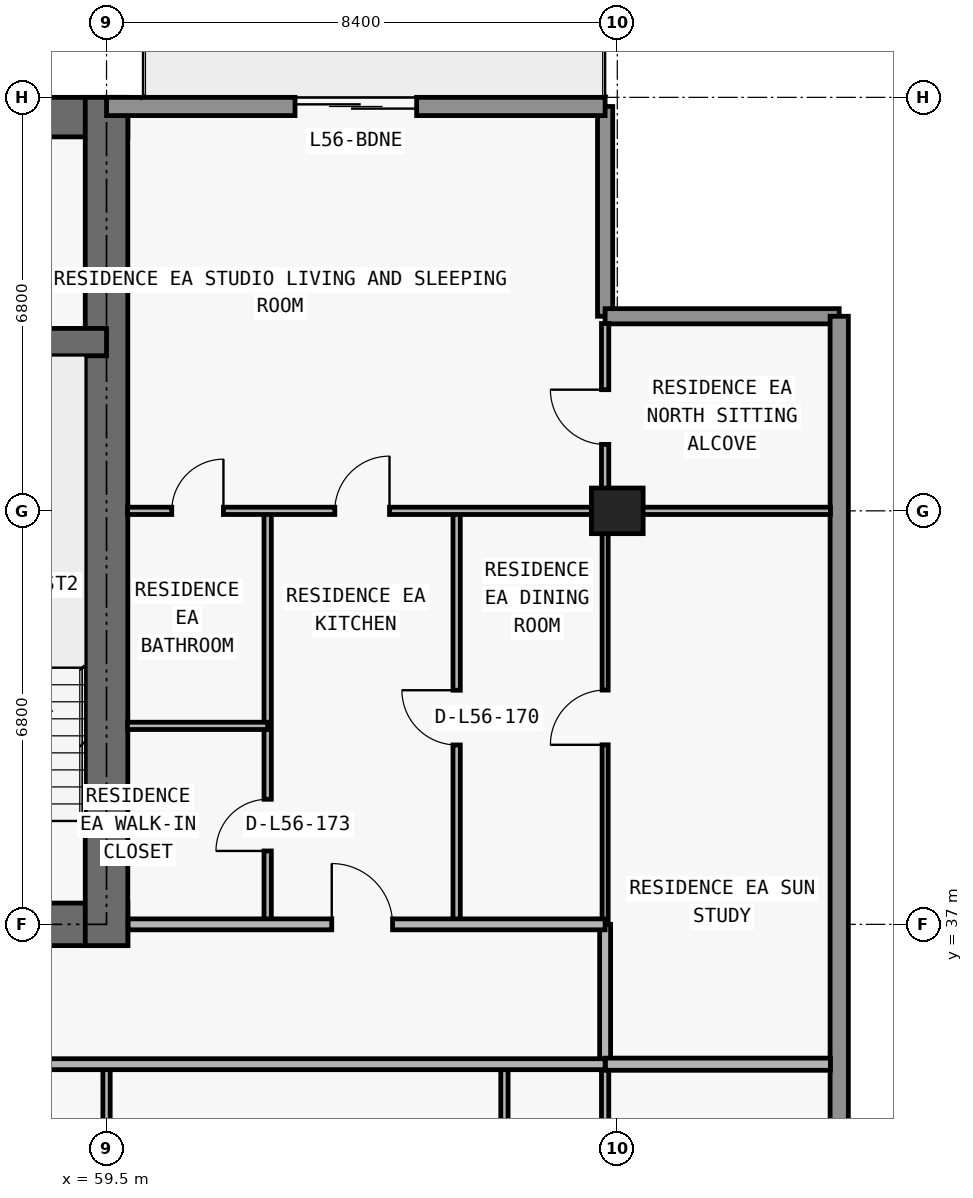
"""IFC4 building model, lengths in metres.
Left out: names, types, materials, properties, quantities, classifications, styles, units other than length and angle.
Written with IfcOpenShell. Run it as: python <this file> out.ifc"""

import sys

from ifc_helpers import new_model, si_unit, direction, frame, frame_2d, origin, origin_2d, place, context, subcontext, project, spatial, rectangle, extrude, element, fill, save


model = new_model("IFC4")
c1 = context("Model", 3, precision=1e-05, world=origin(), true_north=direction((0.0, 1.0)))
c2 = subcontext(c1, "Body", "Model", "MODEL_VIEW")
j1 = project(units=[si_unit("LENGTHUNIT", "METRE"), si_unit("PLANEANGLEUNIT", "RADIAN")], contexts=[c1])
p1 = place(None, origin())
s1 = spatial("IfcSite", under=j1, at=p1, CompositionType="ELEMENT")
p2 = place(p1, origin())
s2 = spatial("IfcBuilding", under=s1, at=p2, CompositionType="ELEMENT")
p3 = place(p2, frame((0.0, 0.0, 201.6)))
s3 = spatial("IfcBuildingStorey", under=s2, at=p3, CompositionType="ELEMENT", Elevation=201.6)
p4 = place(p3, frame((67.9, 43.8, 0.0), z_axis=(0.0, 0.0, 1.0), x_axis=(1.0, 0.0, 0.0)))
e1 = element("IfcColumn", 1, at=p4, inside=s3, PredefinedType="COLUMN", context=c2, shape_type="SweptSolid", body=[
    extrude(rectangle(XDim=0.85, YDim=0.75, at=origin_2d()), origin(), (0.0, 0.0, 1.0), 3.05),
])
p5 = place(p3, frame((17.95, 37.0, 0.0), z_axis=(0.0, 0.0, 1.0), x_axis=(1.0, 0.0, 0.0)))
e2 = element("IfcWall", 2, at=p5, inside=s3, PredefinedType="SHEAR", context=c2, shape_type="SweptSolid", body=[
    extrude(rectangle(XDim=41.9, YDim=0.7, at=frame_2d((20.95, 0.0))), origin(), (0.0, 0.0, 1.0), 3.05),
])
p6 = place(p5, frame((14.35, 0.0, 0.0)))
e3 = element("IfcOpeningElement", 3, at=p6, cuts=e2, PredefinedType="OPENING", context=c2, shape_type="SweptSolid", body=[
    extrude(rectangle(XDim=1.1, YDim=2.15, at=frame_2d((0.55, 1.075))), frame((0.0, 0.36, 0.0), z_axis=(0.0, -1.0, 0.0), x_axis=(1.0, 0.0, 0.0)), (0.0, 0.0, 1.0), 0.72),
])
p7 = place(p5, frame((6.2, 0.0, 0.0)))
e4 = element("IfcOpeningElement", 4, at=p7, cuts=e2, PredefinedType="OPENING", context=c2, shape_type="SweptSolid", body=[
    extrude(rectangle(XDim=1.05, YDim=2.15, at=frame_2d((0.525, 1.075))), frame((0.0, 0.36, 0.0), z_axis=(0.0, -1.0, 0.0), x_axis=(1.0, 0.0, 0.0)), (0.0, 0.0, 1.0), 0.72),
])
p8 = place(p5, frame((34.7, 0.0, 0.0)))
e5 = element("IfcOpeningElement", 5, at=p8, cuts=e2, PredefinedType="OPENING", context=c2, shape_type="SweptSolid", body=[
    extrude(rectangle(XDim=1.05, YDim=2.15, at=frame_2d((0.525, 1.075))), frame((0.0, 0.36, 0.0), z_axis=(0.0, -1.0, 0.0), x_axis=(1.0, 0.0, 0.0)), (0.0, 0.0, 1.0), 0.72),
])
p9 = place(p5, frame((10.812, 0.0, 0.0)))
e6 = element("IfcOpeningElement", 6, at=p9, cuts=e2, PredefinedType="OPENING", context=c2, shape_type="SweptSolid", body=[
    extrude(rectangle(XDim=1.05, YDim=2.15, at=frame_2d((0.525, 1.075))), frame((0.0, 0.36, 0.0), z_axis=(0.0, -1.0, 0.0), x_axis=(1.0, 0.0, 0.0)), (0.0, 0.0, 1.0), 0.72),
])
p10 = place(p5, frame((24.05, 0.0, 0.0)))
e7 = element("IfcOpeningElement", 7, at=p10, cuts=e2, PredefinedType="OPENING", context=c2, shape_type="SweptSolid", body=[
    extrude(rectangle(XDim=1.05, YDim=2.15, at=frame_2d((0.525, 1.075))), frame((0.0, 0.36, 0.0), z_axis=(0.0, -1.0, 0.0), x_axis=(1.0, 0.0, 0.0)), (0.0, 0.0, 1.0), 0.72),
])
p11 = place(p3, frame((17.95, 50.275, 0.0), z_axis=(0.0, 0.0, 1.0), x_axis=(1.0, 0.0, 0.0)))
e8 = element("IfcWall", 8, at=p11, inside=s3, PredefinedType="SHEAR", context=c2, shape_type="SweptSolid", body=[
    extrude(rectangle(XDim=41.9, YDim=0.65, at=frame_2d((20.95, 0.0))), origin(), (0.0, 0.0, 1.0), 3.05),
])
p12 = place(p3, frame((59.5, 36.65, 0.0), z_axis=(0.0, 0.0, 1.0), x_axis=(0.0, 1.0, 0.0)))
e9 = element("IfcWall", 9, at=p12, inside=s3, PredefinedType="SHEAR", context=c2, shape_type="SweptSolid", body=[
    extrude(rectangle(XDim=13.95, YDim=0.7, at=frame_2d((6.975, 0.0))), origin(), (0.0, 0.0, 1.0), 3.05),
])
p13 = place(p3, frame((18.3, 46.575, 0.0), z_axis=(0.0, 0.0, 1.0), x_axis=(1.0, 0.0, 0.0)))
e10 = element("IfcWall", 10, at=p13, inside=s3, PredefinedType="SHEAR", context=c2, shape_type="SweptSolid", body=[
    extrude(rectangle(XDim=41.2, YDim=0.45, at=frame_2d((20.6, 0.0))), origin(), (0.0, 0.0, 1.0), 3.05),
])
p14 = place(p13, frame((7.6, 0.0, 0.0)))
e11 = element("IfcOpeningElement", 11, at=p14, cuts=e10, PredefinedType="OPENING", context=c2, shape_type="SweptSolid", body=[
    extrude(rectangle(XDim=1.0, YDim=2.2, at=frame_2d((0.5, 1.1))), frame((0.0, 0.235, 0.0), z_axis=(0.0, -1.0, 0.0), x_axis=(1.0, 0.0, 0.0)), (0.0, 0.0, 1.0), 0.47),
])
p15 = place(p13, frame((32.625, 0.0, 0.0)))
e12 = element("IfcOpeningElement", 12, at=p15, cuts=e10, PredefinedType="OPENING", context=c2, shape_type="SweptSolid", body=[
    extrude(rectangle(XDim=1.05, YDim=2.15, at=frame_2d((0.525, 1.075))), frame((0.0, 0.235, 0.0), z_axis=(0.0, -1.0, 0.0), x_axis=(1.0, 0.0, 0.0)), (0.0, 0.0, 1.0), 0.47),
])
p16 = place(p3, frame((67.7, 50.45, 0.0), z_axis=(0.0, 0.0, 1.0), x_axis=(0.0, -1.0, 0.0)))
e13 = element("IfcWall", 13, at=p16, inside=s3, PredefinedType="ELEMENTEDWALL", context=c2, shape_type="SweptSolid", body=[
    extrude(rectangle(XDim=3.45, YDim=0.25, at=frame_2d((1.725, 0.0))), origin(), (0.0, 0.0, 1.0), 3.05),
])
p17 = place(p3, frame((67.7, 47.0, 0.0), z_axis=(0.0, 0.0, 1.0), x_axis=(1.0, 0.0, 0.0)))
e14 = element("IfcWall", 14, at=p17, inside=s3, PredefinedType="ELEMENTEDWALL", context=c2, shape_type="SweptSolid", body=[
    extrude(rectangle(XDim=3.85, YDim=0.25, at=frame_2d((1.925, 0.0))), origin(), (0.0, 0.0, 1.0), 3.05),
])
p18 = place(p3, frame((71.55, 47.0, 0.0), z_axis=(0.0, 0.0, 1.0), x_axis=(0.0, -1.0, 0.0)))
e15 = element("IfcWall", 15, at=p18, inside=s3, PredefinedType="STANDARD", context=c2, shape_type="SweptSolid", body=[
    extrude(rectangle(XDim=17.9, YDim=0.3, at=frame_2d((8.95, 0.0))), origin(), (0.0, 0.0, 1.0), 3.05),
])
p19 = place(p3, frame((59.5, 50.45, 0.0), z_axis=(0.0, 0.0, 1.0), x_axis=(1.0, 0.0, 0.0)))
e16 = element("IfcWall", 16, at=p19, inside=s3, PredefinedType="STANDARD", context=c2, shape_type="SweptSolid", body=[
    extrude(rectangle(XDim=8.2, YDim=0.3, at=frame_2d((4.1, 0.0))), origin(), (0.0, 0.0, 1.0), 3.05),
])
p20 = place(p19, frame((3.1, 0.0, 0.0)))
e17 = element("IfcOpeningElement", 17, at=p20, cuts=e16, PredefinedType="OPENING", context=c2, shape_type="SweptSolid", body=[
    extrude(rectangle(XDim=2.0, YDim=2.3, at=frame_2d((1.0, 1.15))), frame((0.0, 0.16, 0.0), z_axis=(0.0, -1.0, 0.0), x_axis=(1.0, 0.0, 0.0)), (0.0, 0.0, 1.0), 0.32),
])
p21 = place(p3, frame((59.5, 11.24, 0.0), z_axis=(0.0, 0.0, 1.0), x_axis=(0.0, 1.0, 0.0)))
e18 = element("IfcWall", 18, at=p21, inside=s3, PredefinedType="PARTITIONING", context=c2, shape_type="SweptSolid", body=[
    extrude(rectangle(XDim=23.46, YDim=0.12, at=frame_2d((11.73, 0.0))), origin(), (0.0, 0.0, 1.0), 2.263),
])
p22 = place(p21, frame((14.71, 0.0, 0.0)))
e19 = element("IfcOpeningElement", 19, at=p22, cuts=e18, PredefinedType="OPENING", context=c2, shape_type="SweptSolid", body=[
    extrude(rectangle(XDim=0.9, YDim=2.15, at=frame_2d((0.45, 1.075))), frame((0.0, 0.07, 0.0), z_axis=(0.0, -1.0, 0.0), x_axis=(1.0, 0.0, 0.0)), (0.0, 0.0, 1.0), 0.14),
])
p23 = place(p3, frame((62.15, 37.0, 0.0), z_axis=(0.0, 0.0, 1.0), x_axis=(0.0, 1.0, 0.0)))
e20 = element("IfcWall", 20, at=p23, inside=s3, PredefinedType="PARTITIONING", context=c2, shape_type="SweptSolid", body=[
    extrude(rectangle(XDim=6.8, YDim=0.12, at=frame_2d((3.4, 0.0))), origin(), (0.0, 0.0, 1.0), 2.578),
])
p24 = place(p23, frame((1.207, 0.0, 0.0)))
e21 = element("IfcOpeningElement", 21, at=p24, cuts=e20, PredefinedType="OPENING", context=c2, shape_type="SweptSolid", body=[
    extrude(rectangle(XDim=0.85, YDim=2.1, at=frame_2d((0.425, 1.05))), frame((0.0, 0.07, 0.0), z_axis=(0.0, -1.0, 0.0), x_axis=(1.0, 0.0, 0.0)), (0.0, 0.0, 1.0), 0.14),
])
p25 = place(p3, frame((65.258, 37.0, 0.0), z_axis=(0.0, 0.0, 1.0), x_axis=(0.0, 1.0, 0.0)))
e22 = element("IfcWall", 22, at=p25, inside=s3, PredefinedType="PARTITIONING", context=c2, shape_type="SweptSolid", body=[
    extrude(rectangle(XDim=6.8, YDim=0.12, at=frame_2d((3.4, 0.0))), origin(), (0.0, 0.0, 1.0), 2.679),
])
p26 = place(p25, frame((2.95, 0.0, 0.0)))
e23 = element("IfcOpeningElement", 23, at=p26, cuts=e22, PredefinedType="OPENING", context=c2, shape_type="SweptSolid", body=[
    extrude(rectangle(XDim=0.9, YDim=2.15, at=frame_2d((0.45, 1.075))), frame((0.0, 0.07, 0.0), z_axis=(0.0, -1.0, 0.0), x_axis=(1.0, 0.0, 0.0)), (0.0, 0.0, 1.0), 0.14),
])
p27 = place(p3, frame((66.044, 28.6, 0.0), z_axis=(0.0, 0.0, 1.0), x_axis=(0.0, 1.0, 0.0)))
e24 = element("IfcWall", 24, at=p27, inside=s3, PredefinedType="PARTITIONING", context=c2, shape_type="SweptSolid", body=[
    extrude(rectangle(XDim=6.1, YDim=0.12, at=frame_2d((3.05, 0.0))), origin(), (0.0, 0.0, 1.0), 3.05),
])
p28 = place(p27, frame((2.625, 0.0, 0.0)))
e25 = element("IfcOpeningElement", 25, at=p28, cuts=e24, PredefinedType="OPENING", context=c2, shape_type="SweptSolid", body=[
    extrude(rectangle(XDim=0.85, YDim=2.1, at=frame_2d((0.425, 1.05))), frame((0.0, 0.07, 0.0), z_axis=(0.0, -1.0, 0.0), x_axis=(1.0, 0.0, 0.0)), (0.0, 0.0, 1.0), 0.14),
])
p29 = place(p3, frame((67.7, 11.32, 0.0), z_axis=(0.0, 0.0, 1.0), x_axis=(0.0, 1.0, 0.0)))
e26 = element("IfcWall", 26, at=p29, inside=s3, PredefinedType="PARTITIONING", context=c2, shape_type="SweptSolid", body=[
    extrude(rectangle(XDim=23.38, YDim=0.12, at=frame_2d((11.69, 0.0))), origin(), (0.0, 0.0, 1.0), 2.263),
])
p30 = place(p29, frame((14.63, 0.0, 0.0)))
e27 = element("IfcOpeningElement", 27, at=p30, cuts=e26, PredefinedType="OPENING", context=c2, shape_type="SweptSolid", body=[
    extrude(rectangle(XDim=0.9, YDim=2.15, at=frame_2d((0.45, 1.075))), frame((0.0, 0.07, 0.0), z_axis=(0.0, -1.0, 0.0), x_axis=(1.0, 0.0, 0.0)), (0.0, 0.0, 1.0), 0.14),
])
p31 = place(p3, frame((67.7, 34.705, 0.0), z_axis=(0.0, 0.0, 1.0), x_axis=(0.0, 1.0, 0.0)))
e28 = element("IfcWall", 28, at=p31, inside=s3, PredefinedType="PARTITIONING", context=c2, shape_type="SweptSolid", body=[
    extrude(rectangle(XDim=2.295, YDim=0.18, at=frame_2d((1.147, 0.0))), origin(), (0.0, 0.0, 1.0), 2.263),
])
p32 = place(p3, frame((67.7, 37.005, 0.0), z_axis=(0.0, 0.0, 1.0), x_axis=(0.0, 1.0, 0.0)))
e29 = element("IfcWall", 29, at=p32, inside=s3, PredefinedType="MOVABLE", context=c2, shape_type="SweptSolid", body=[
    extrude(rectangle(XDim=6.795, YDim=0.1, at=frame_2d((3.397, 0.0))), origin(), (0.0, 0.0, 1.0), 2.263),
])
p33 = place(p32, frame((2.948, 0.0, 0.0)))
e30 = element("IfcOpeningElement", 30, at=p33, cuts=e29, PredefinedType="OPENING", context=c2, shape_type="SweptSolid", body=[
    extrude(rectangle(XDim=0.9, YDim=2.15, at=frame_2d((0.45, 1.075))), frame((0.0, 0.06, 0.0), z_axis=(0.0, -1.0, 0.0), x_axis=(1.0, 0.0, 0.0)), (0.0, 0.0, 1.0), 0.12),
])
p34 = place(p3, frame((67.7, 43.805, 0.0), z_axis=(0.0, 0.0, 1.0), x_axis=(0.0, 1.0, 0.0)))
e31 = element("IfcWall", 31, at=p34, inside=s3, PredefinedType="PARTITIONING", context=c2, shape_type="SweptSolid", body=[
    extrude(rectangle(XDim=3.075, YDim=0.12, at=frame_2d((1.538, 0.0))), origin(), (0.0, 0.0, 1.0), 3.05),
])
p35 = place(p34, frame((1.087, 0.0, 0.0)))
e32 = element("IfcOpeningElement", 32, at=p35, cuts=e31, PredefinedType="OPENING", context=c2, shape_type="SweptSolid", body=[
    extrude(rectangle(XDim=0.9, YDim=2.15, at=frame_2d((0.45, 1.075))), frame((0.0, 0.07, 0.0), z_axis=(0.0, -1.0, 0.0), x_axis=(1.0, 0.0, 0.0)), (0.0, 0.0, 1.0), 0.14),
])
p36 = place(p3, frame((41.2, 34.7, 0.0), z_axis=(0.0, 0.0, 1.0), x_axis=(1.0, 0.0, 0.0)))
e33 = element("IfcWall", 33, at=p36, inside=s3, PredefinedType="PARTITIONING", context=c2, shape_type="SweptSolid", body=[
    extrude(rectangle(XDim=26.5, YDim=0.18, at=frame_2d((13.25, 0.0))), origin(), (0.0, 0.0, 1.0), 3.05),
])
p37 = place(p36, frame((12.77, 0.0, 0.0)))
e34 = element("IfcOpeningElement", 34, at=p37, cuts=e33, PredefinedType="OPENING", context=c2, shape_type="SweptSolid", body=[
    extrude(rectangle(XDim=1.0, YDim=2.2, at=frame_2d((0.5, 1.1))), frame((0.0, 0.1, 0.0), z_axis=(0.0, -1.0, 0.0), x_axis=(1.0, 0.0, 0.0)), (0.0, 0.0, 1.0), 0.2),
])
p38 = place(p3, frame((67.705, 34.7, 0.0), z_axis=(0.0, 0.0, 1.0), x_axis=(1.0, 0.0, 0.0)))
e35 = element("IfcWall", 35, at=p38, inside=s3, PredefinedType="PARTITIONING", context=c2, shape_type="SweptSolid", body=[
    extrude(rectangle(XDim=3.7, YDim=0.2, at=frame_2d((1.85, 0.0))), origin(), (0.0, 0.0, 1.0), 3.05),
])
p39 = place(p3, frame((59.855, 37.0, 0.0), z_axis=(0.0, 0.0, 1.0), x_axis=(1.0, 0.0, 0.0)))
e36 = element("IfcWall", 36, at=p39, inside=s3, PredefinedType="PARTITIONING", context=c2, shape_type="SweptSolid", body=[
    extrude(rectangle(XDim=7.845, YDim=0.18, at=frame_2d((3.922, 0.0))), origin(), (0.0, 0.0, 1.0), 3.05),
])
p40 = place(p39, frame((3.349, 0.0, 0.0)))
e37 = element("IfcOpeningElement", 37, at=p40, cuts=e36, PredefinedType="OPENING", context=c2, shape_type="SweptSolid", body=[
    extrude(rectangle(XDim=1.0, YDim=2.2, at=frame_2d((0.5, 1.1))), frame((0.0, 0.1, 0.0), z_axis=(0.0, -1.0, 0.0), x_axis=(1.0, 0.0, 0.0)), (0.0, 0.0, 1.0), 0.2),
])
p41 = place(p3, frame((59.845, 40.264, 0.0), z_axis=(0.0, 0.0, 1.0), x_axis=(1.0, 0.0, 0.0)))
e38 = element("IfcWall", 38, at=p41, inside=s3, PredefinedType="PARTITIONING", context=c2, shape_type="SweptSolid", body=[
    extrude(rectangle(XDim=2.305, YDim=0.12, at=frame_2d((1.152, 0.0))), origin(), (0.0, 0.0, 1.0), 3.05),
])
p42 = place(p3, frame((59.845, 43.8, 0.0), z_axis=(0.0, 0.0, 1.0), x_axis=(1.0, 0.0, 0.0)))
e39 = element("IfcWall", 39, at=p42, inside=s3, PredefinedType="PARTITIONING", context=c2, shape_type="SweptSolid", body=[
    extrude(rectangle(XDim=11.56, YDim=0.12, at=frame_2d((5.78, 0.0))), origin(), (0.0, 0.0, 1.0), 2.418),
])
p43 = place(p42, frame((3.409, 0.0, 0.0)))
e40 = element("IfcOpeningElement", 40, at=p43, cuts=e39, PredefinedType="OPENING", context=c2, shape_type="SweptSolid", body=[
    extrude(rectangle(XDim=0.9, YDim=2.15, at=frame_2d((0.45, 1.075))), frame((0.0, 0.07, 0.0), z_axis=(0.0, -1.0, 0.0), x_axis=(1.0, 0.0, 0.0)), (0.0, 0.0, 1.0), 0.14),
])
p44 = place(p42, frame((0.728, 0.0, 0.0)))
e41 = element("IfcOpeningElement", 41, at=p44, cuts=e39, PredefinedType="OPENING", context=c2, shape_type="SweptSolid", body=[
    extrude(rectangle(XDim=0.85, YDim=2.1, at=frame_2d((0.425, 1.05))), frame((0.0, 0.07, 0.0), z_axis=(0.0, -1.0, 0.0), x_axis=(1.0, 0.0, 0.0)), (0.0, 0.0, 1.0), 0.14),
])
p45 = place(p20, origin())
e42 = element("IfcDoor", 42, at=p45, inside=s3, OperationType="DOUBLE_DOOR_SLIDING", PredefinedType="DOOR", context=c2, shape_type="SweptSolid", body=[
    extrude(rectangle(XDim=2.0, YDim=2.3, at=frame_2d((1.0, 1.15))), frame((0.0, 0.025, 0.0), z_axis=(0.0, -1.0, 0.0), x_axis=(1.0, 0.0, 0.0)), (0.0, 0.0, 1.0), 0.05),
])
fill(e17, e42)
p46 = place(p26, origin())
e43 = element("IfcDoor", 43, at=p46, inside=s3, OperationType="SINGLE_SWING_RIGHT", PredefinedType="DOOR", context=c2, shape_type="SweptSolid", body=[
    extrude(rectangle(XDim=0.9, YDim=2.15, at=frame_2d((0.45, 1.075))), frame((0.0, 0.025, 0.0), z_axis=(0.0, -1.0, 0.0), x_axis=(1.0, 0.0, 0.0)), (0.0, 0.0, 1.0), 0.05),
])
fill(e23, e43)
p47 = place(p40, origin())
e44 = element("IfcDoor", 44, at=p47, inside=s3, OperationType="SINGLE_SWING_LEFT", PredefinedType="DOOR", context=c2, shape_type="SweptSolid", body=[
    extrude(rectangle(XDim=1.0, YDim=2.2, at=frame_2d((0.5, 1.1))), frame((0.0, 0.025, 0.0), z_axis=(0.0, -1.0, 0.0), x_axis=(1.0, 0.0, 0.0)), (0.0, 0.0, 1.0), 0.05),
])
fill(e37, e44)
p48 = place(p43, origin())
e45 = element("IfcDoor", 45, at=p48, inside=s3, OperationType="SINGLE_SWING_RIGHT", PredefinedType="DOOR", context=c2, shape_type="SweptSolid", body=[
    extrude(rectangle(XDim=0.9, YDim=2.15, at=frame_2d((0.45, 1.075))), frame((0.0, 0.025, 0.0), z_axis=(0.0, -1.0, 0.0), x_axis=(1.0, 0.0, 0.0)), (0.0, 0.0, 1.0), 0.05),
])
fill(e40, e45)
p49 = place(p24, origin())
e46 = element("IfcDoor", 46, at=p49, inside=s3, OperationType="SINGLE_SWING_LEFT", PredefinedType="DOOR", context=c2, shape_type="SweptSolid", body=[
    extrude(rectangle(XDim=0.85, YDim=2.1, at=frame_2d((0.425, 1.05))), frame((0.0, 0.025, 0.0), z_axis=(0.0, -1.0, 0.0), x_axis=(1.0, 0.0, 0.0)), (0.0, 0.0, 1.0), 0.05),
])
fill(e21, e46)
p50 = place(p44, origin())
e47 = element("IfcDoor", 47, at=p50, inside=s3, OperationType="SINGLE_SWING_RIGHT", PredefinedType="DOOR", context=c2, shape_type="SweptSolid", body=[
    extrude(rectangle(XDim=0.85, YDim=2.1, at=frame_2d((0.425, 1.05))), frame((0.0, 0.025, 0.0), z_axis=(0.0, -1.0, 0.0), x_axis=(1.0, 0.0, 0.0)), (0.0, 0.0, 1.0), 0.05),
])
fill(e41, e47)
p51 = place(p33, origin())
e48 = element("IfcDoor", 48, at=p51, inside=s3, OperationType="SINGLE_SWING_LEFT", PredefinedType="DOOR", context=c2, shape_type="SweptSolid", body=[
    extrude(rectangle(XDim=0.9, YDim=2.15, at=frame_2d((0.45, 1.075))), frame((0.0, 0.025, 0.0), z_axis=(0.0, -1.0, 0.0), x_axis=(1.0, 0.0, 0.0)), (0.0, 0.0, 1.0), 0.05),
])
fill(e30, e48)
p52 = place(p35, origin())
e49 = element("IfcDoor", 49, at=p52, inside=s3, OperationType="SINGLE_SWING_RIGHT", PredefinedType="DOOR", context=c2, shape_type="SweptSolid", body=[
    extrude(rectangle(XDim=0.9, YDim=2.15, at=frame_2d((0.45, 1.075))), frame((0.0, 0.025, 0.0), z_axis=(0.0, -1.0, 0.0), x_axis=(1.0, 0.0, 0.0)), (0.0, 0.0, 1.0), 0.05),
])
fill(e32, e49)
save(model, sys.argv[1])
